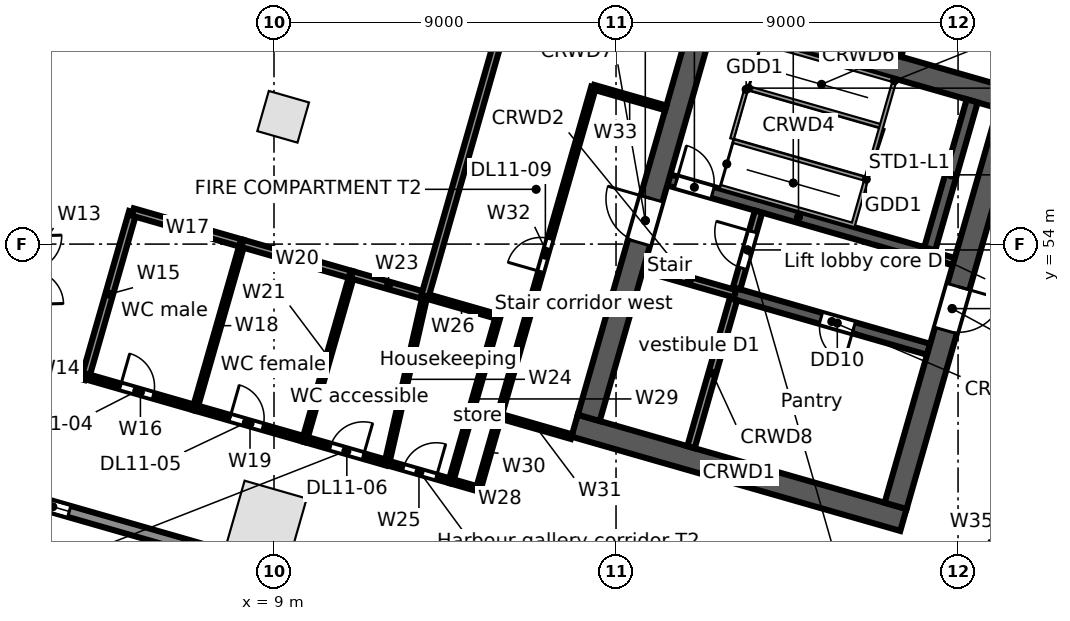
"""IFC4 building model, lengths in metres.
Left out: names, types, materials, properties, quantities, classifications, styles, units other than length and angle.
Written with IfcOpenShell. Run it as: python <this file> out.ifc"""

import sys

from ifc_helpers import new_model, si_unit, direction, frame, frame_2d, origin, origin_2d, place, context, subcontext, project, spatial, rectangle, extrude, element, fill, save


model = new_model("IFC4")
c1 = context("Model", 3, precision=1e-05, world=origin(), true_north=direction((0.0, 1.0)))
c2 = subcontext(c1, "Body", "Model", "MODEL_VIEW")
j1 = project(units=[si_unit("LENGTHUNIT", "METRE"), si_unit("PLANEANGLEUNIT", "RADIAN")], contexts=[c1])
p1 = place(None, origin())
s1 = spatial("IfcSite", under=j1, at=p1, CompositionType="ELEMENT")
p2 = place(p1, origin())
s2 = spatial("IfcBuilding", under=s1, at=p2, CompositionType="ELEMENT")
p3 = place(p2, frame((0.0, 0.0, 56.5)))
s3 = spatial("IfcBuildingStorey", under=s2, at=p3, CompositionType="ELEMENT", Elevation=56.5)
p4 = place(p3, frame((8.81, 46.722, 0.0), z_axis=(0.0, 0.0, 1.0), x_axis=(0.961261695938, -0.275637355817, 0.0)))
e1 = element("IfcColumn", 1, at=p4, inside=s3, PredefinedType="COLUMN", context=c2, shape_type="SweptSolid", body=[
    extrude(rectangle(XDim=1.7, YDim=1.7, at=origin_2d()), origin(), (0.0, 0.0, 1.0), 5.0),
])
p5 = place(p3, frame((9.241, 57.35, 0.0), z_axis=(0.0, 0.0, 1.0), x_axis=(0.961261695938, -0.275637355817, 0.0)))
e2 = element("IfcColumn", 2, at=p5, inside=s3, PredefinedType="COLUMN", context=c2, shape_type="SweptSolid", body=[
    extrude(rectangle(XDim=1.1, YDim=1.1, at=origin_2d()), origin(), (0.0, 0.0, 1.0), 5.0),
])
p6 = place(p3, frame((25.398, 40.717, 0.0), z_axis=(0.0, 0.0, 1.0), x_axis=(-0.961262423262, 0.275634819324, 0.0)))
e3 = element("IfcWall", 3, at=p6, inside=s3, PredefinedType="STANDARD", context=c2, shape_type="SweptSolid", body=[
    extrude(rectangle(XDim=26.359, YDim=0.3, at=frame_2d((13.179, 0.0))), origin(), (0.0, 0.0, 1.0), 4.68),
])
p7 = place(p6, frame((22.664, 0.0, 0.6)))
e4 = element("IfcOpeningElement", 4, at=p7, cuts=e3, PredefinedType="OPENING", context=c2, shape_type="SweptSolid", body=[
    extrude(rectangle(XDim=0.9, YDim=3.2, at=frame_2d((0.45, 1.6))), frame((0.0, 0.16, 0.0), z_axis=(0.0, -1.0, 0.0), x_axis=(1.0, 0.0, 0.0)), (0.0, 0.0, 1.0), 0.32),
])
p8 = place(p6, frame((13.844, 0.0, 0.6)))
e5 = element("IfcOpeningElement", 5, at=p8, cuts=e3, PredefinedType="OPENING", context=c2, shape_type="SweptSolid", body=[
    extrude(rectangle(XDim=0.9, YDim=3.2, at=frame_2d((0.45, 1.6))), frame((0.0, 0.16, 0.0), z_axis=(0.0, -1.0, 0.0), x_axis=(1.0, 0.0, 0.0)), (0.0, 0.0, 1.0), 0.32),
])
p9 = place(p6, frame((5.023, 0.0, 0.6)))
e6 = element("IfcOpeningElement", 6, at=p9, cuts=e3, PredefinedType="OPENING", context=c2, shape_type="SweptSolid", body=[
    extrude(rectangle(XDim=0.9, YDim=3.2, at=frame_2d((0.45, 1.6))), frame((0.0, 0.16, 0.0), z_axis=(0.0, -1.0, 0.0), x_axis=(1.0, 0.0, 0.0)), (0.0, 0.0, 1.0), 0.32),
])
p10 = place(p3, frame((16.911, 49.221, 0.0), z_axis=(0.0, 0.0, 1.0), x_axis=(0.96126248289, -0.275634611374, 0.0)))
e7 = element("IfcWall", 7, at=p10, inside=s3, PredefinedType="SOLIDWALL", context=c2, shape_type="SweptSolid", body=[
    extrude(rectangle(XDim=9.0, YDim=0.6, at=frame_2d((4.5, 0.0))), origin(), (0.0, 0.0, 1.0), 4.68),
])
p11 = place(p3, frame((18.728, 53.382, 0.0), z_axis=(0.0, 0.0, 1.0), x_axis=(0.961247070632, -0.275688355216, 0.0)))
e8 = element("IfcWall", 8, at=p11, inside=s3, PredefinedType="SOLIDWALL", context=c2, shape_type="SweptSolid", body=[
    extrude(rectangle(XDim=2.5, YDim=0.2, at=frame_2d((1.25, 0.0))), origin(), (0.0, 0.0, 1.0), 4.68),
])
p12 = place(p3, frame((21.131, 52.692, 0.0), z_axis=(0.0, 0.0, 1.0), x_axis=(0.961271492568, -0.275603188616, 0.0)))
e9 = element("IfcWall", 9, at=p12, inside=s3, PredefinedType="SOLIDWALL", context=c2, shape_type="SweptSolid", body=[
    extrude(rectangle(XDim=5.3, YDim=0.3, at=frame_2d((2.65, 0.0))), origin(), (0.0, 0.0, 1.0), 4.68),
])
p13 = place(p12, frame((2.35, 0.0, 0.0)))
e10 = element("IfcOpeningElement", 10, at=p13, cuts=e9, PredefinedType="OPENING", context=c2, shape_type="SweptSolid", body=[
    extrude(rectangle(XDim=0.9, YDim=2.1, at=frame_2d((0.45, 1.05))), frame((0.0, 0.16, 0.0), z_axis=(0.0, -1.0, 0.0), x_axis=(1.0, 0.0, 0.0)), (0.0, 0.0, 1.0), 0.32),
])
p14 = place(p3, frame((19.389, 55.689, 0.0), z_axis=(0.0, 0.0, 1.0), x_axis=(0.961261397636, -0.275638396117, 0.0)))
e11 = element("IfcWall", 11, at=p14, inside=s3, PredefinedType="SOLIDWALL", context=c2, shape_type="SweptSolid", body=[
    extrude(rectangle(XDim=7.1, YDim=0.3, at=frame_2d((3.55, 0.0))), origin(), (0.0, 0.0, 1.0), 4.68),
])
p15 = place(p14, frame((0.2, 0.0, 0.0)))
e12 = element("IfcOpeningElement", 12, at=p15, cuts=e11, PredefinedType="OPENING", context=c2, shape_type="SweptSolid", body=[
    extrude(rectangle(XDim=1.0, YDim=2.1, at=frame_2d((0.5, 1.05))), frame((0.0, 0.16, 0.0), z_axis=(0.0, -1.0, 0.0), x_axis=(1.0, 0.0, 0.0)), (0.0, 0.0, 1.0), 0.32),
])
p16 = place(p3, frame((26.214, 53.732, 0.0), z_axis=(0.0, 0.0, 1.0), x_axis=(0.96122076476, -0.27578005982, 0.0)))
e13 = element("IfcWall", 13, at=p16, inside=s3, PredefinedType="SOLIDWALL", context=c2, shape_type="SweptSolid", body=[
    extrude(rectangle(XDim=0.7, YDim=0.2, at=frame_2d((0.35, 0.0))), origin(), (0.0, 0.0, 1.0), 4.68),
])
p17 = place(p3, frame((20.053, 60.18, 0.0), z_axis=(0.0, 0.0, 1.0), x_axis=(0.96126248289, -0.275634611374, 0.0)))
e14 = element("IfcWall", 14, at=p17, inside=s3, PredefinedType="SOLIDWALL", context=c2, shape_type="SweptSolid", body=[
    extrude(rectangle(XDim=9.0, YDim=0.6, at=frame_2d((4.5, 0.0))), origin(), (0.0, 0.0, 1.0), 4.68),
])
p18 = place(p3, frame((17.282, 49.427, 0.0), z_axis=(0.0, 0.0, 1.0), x_axis=(0.275631631629, 0.961263337304, 0.0)))
e15 = element("IfcWall", 15, at=p18, inside=s3, PredefinedType="SOLIDWALL", context=c2, shape_type="SweptSolid", body=[
    extrude(rectangle(XDim=10.8, YDim=0.6, at=frame_2d((5.4, 0.0))), origin(), (0.0, 0.0, 1.0), 4.68),
])
p19 = place(p18, frame((4.8, 0.0, 0.0)))
e16 = element("IfcOpeningElement", 16, at=p19, cuts=e15, PredefinedType="OPENING", context=c2, shape_type="SweptSolid", body=[
    extrude(rectangle(XDim=1.2, YDim=2.1, at=frame_2d((0.6, 1.05))), frame((0.0, 0.31, 0.0), z_axis=(0.0, -1.0, 0.0), x_axis=(1.0, 0.0, 0.0)), (0.0, 0.0, 1.0), 0.62),
])
p20 = place(p3, frame((19.973, 48.655, 0.0), z_axis=(0.0, 0.0, 1.0), x_axis=(0.275668441653, 0.961252781674, 0.0)))
e17 = element("IfcWall", 17, at=p20, inside=s3, PredefinedType="SOLIDWALL", context=c2, shape_type="SweptSolid", body=[
    extrude(rectangle(XDim=4.05, YDim=0.2, at=frame_2d((2.025, 0.0))), origin(), (0.0, 0.0, 1.0), 4.68),
])
p21 = place(p3, frame((21.172, 52.837, 0.0), z_axis=(0.0, 0.0, 1.0), x_axis=(0.275657676022, 0.961255868981, 0.0)))
e18 = element("IfcWall", 18, at=p21, inside=s3, PredefinedType="PARTITIONING", context=c2, shape_type="SweptSolid", body=[
    extrude(rectangle(XDim=2.1, YDim=0.2, at=frame_2d((1.05, 0.0))), origin(), (0.0, 0.0, 1.0), 4.68),
])
p22 = place(p21, frame((0.55, 0.0, 0.0)))
e19 = element("IfcOpeningElement", 19, at=p22, cuts=e18, PredefinedType="OPENING", context=c2, shape_type="SweptSolid", body=[
    extrude(rectangle(XDim=1.0, YDim=2.1, at=frame_2d((0.5, 1.05))), frame((0.0, 0.11, 0.0), z_axis=(0.0, -1.0, 0.0), x_axis=(1.0, 0.0, 0.0)), (0.0, 0.0, 1.0), 0.22),
])
p23 = place(p3, frame((26.256, 53.876, 0.0), z_axis=(0.0, 0.0, 1.0), x_axis=(0.275612739511, 0.961268754209, 0.0)))
e20 = element("IfcWall", 20, at=p23, inside=s3, PredefinedType="SOLIDWALL", context=c2, shape_type="SweptSolid", body=[
    extrude(rectangle(XDim=4.05, YDim=0.3, at=frame_2d((2.025, 0.0))), origin(), (0.0, 0.0, 1.0), 4.68),
])
p24 = place(p3, frame((25.356, 47.112, 0.0), z_axis=(0.0, 0.0, 1.0), x_axis=(0.275631631629, 0.961263337304, 0.0)))
e21 = element("IfcWall", 21, at=p24, inside=s3, PredefinedType="SOLIDWALL", context=c2, shape_type="SweptSolid", body=[
    extrude(rectangle(XDim=10.8, YDim=0.6, at=frame_2d((5.4, 0.0))), origin(), (0.0, 0.0, 1.0), 4.68),
])
p25 = place(p24, frame((4.8, 0.0, 0.0)))
e22 = element("IfcOpeningElement", 22, at=p25, cuts=e21, PredefinedType="OPENING", context=c2, shape_type="SweptSolid", body=[
    extrude(rectangle(XDim=1.2, YDim=2.1, at=frame_2d((0.6, 1.05))), frame((0.0, 0.31, 0.0), z_axis=(0.0, -1.0, 0.0), x_axis=(1.0, 0.0, 0.0)), (0.0, 0.0, 1.0), 0.62),
])
p26 = place(p3, frame((2.601, 50.932, 0.0), z_axis=(0.0, 0.0, 1.0), x_axis=(0.961197773994, -0.27586018065, 0.0)))
e23 = element("IfcWall", 23, at=p26, inside=s3, PredefinedType="PARTITIONING", context=c2, shape_type="SweptSolid", body=[
    extrude(rectangle(XDim=1.5, YDim=0.2, at=frame_2d((0.75, 0.0))), origin(), (0.0, 0.0, 1.0), 4.68),
])
p27 = place(p3, frame((4.043, 50.518, 0.0), z_axis=(0.0, 0.0, 1.0), x_axis=(0.275745553681, 0.96123066411, 0.0)))
e24 = element("IfcWall", 24, at=p27, inside=s3, PredefinedType="PARTITIONING", context=c2, shape_type="SweptSolid", body=[
    extrude(rectangle(XDim=4.5, YDim=0.2, at=frame_2d((2.25, 0.0))), origin(), (0.0, 0.0, 1.0), 4.68),
])
p28 = place(p3, frame((4.043, 50.518, 0.0), z_axis=(0.0, 0.0, 1.0), x_axis=(0.961247103494, -0.275688240636, 0.0)))
e25 = element("IfcWall", 25, at=p28, inside=s3, PredefinedType="PARTITIONING", context=c2, shape_type="SweptSolid", body=[
    extrude(rectangle(XDim=3.0, YDim=0.15, at=frame_2d((1.5, 0.0))), origin(), (0.0, 0.0, 1.0), 4.68),
])
p29 = place(p28, frame((0.95, 0.0, 0.0)))
e26 = element("IfcOpeningElement", 26, at=p29, cuts=e25, PredefinedType="OPENING", context=c2, shape_type="SweptSolid", body=[
    extrude(rectangle(XDim=0.9, YDim=2.1, at=frame_2d((0.45, 1.05))), frame((0.0, 0.085, 0.0), z_axis=(0.0, -1.0, 0.0), x_axis=(1.0, 0.0, 0.0)), (0.0, 0.0, 1.0), 0.17),
])
p30 = place(p3, frame((5.284, 54.844, 0.0), z_axis=(0.0, 0.0, 1.0), x_axis=(0.961243927922, -0.275699312717, 0.0)))
e27 = element("IfcWall", 27, at=p30, inside=s3, PredefinedType="PARTITIONING", context=c2, shape_type="SweptSolid", body=[
    extrude(rectangle(XDim=2.999, YDim=0.2, at=frame_2d((1.5, 0.0))), origin(), (0.0, 0.0, 1.0), 4.68),
])
p31 = place(p3, frame((6.927, 49.691, 0.0), z_axis=(0.0, 0.0, 1.0), x_axis=(0.275530671241, 0.961292280841, 0.0)))
e28 = element("IfcWall", 28, at=p31, inside=s3, PredefinedType="PARTITIONING", context=c2, shape_type="SweptSolid", body=[
    extrude(rectangle(XDim=4.5, YDim=0.125, at=frame_2d((2.25, 0.0))), origin(), (0.0, 0.0, 1.0), 4.68),
])
p32 = place(p3, frame((6.927, 49.691, 0.0), z_axis=(0.0, 0.0, 1.0), x_axis=(0.961268664977, -0.27561305073, 0.0)))
e29 = element("IfcWall", 29, at=p32, inside=s3, PredefinedType="PARTITIONING", context=c2, shape_type="SweptSolid", body=[
    extrude(rectangle(XDim=3.0, YDim=0.15, at=frame_2d((1.5, 0.0))), origin(), (0.0, 0.0, 1.0), 3.742),
])
p33 = place(p32, frame((0.95, 0.0, 0.0)))
e30 = element("IfcOpeningElement", 30, at=p33, cuts=e29, PredefinedType="OPENING", context=c2, shape_type="SweptSolid", body=[
    extrude(rectangle(XDim=0.9, YDim=2.1, at=frame_2d((0.45, 1.05))), frame((0.0, 0.085, 0.0), z_axis=(0.0, -1.0, 0.0), x_axis=(1.0, 0.0, 0.0)), (0.0, 0.0, 1.0), 0.17),
])
p34 = place(p3, frame((8.167, 54.017, 0.0), z_axis=(0.0, 0.0, 1.0), x_axis=(0.961247103494, -0.275688240636, 0.0)))
e31 = element("IfcWall", 31, at=p34, inside=s3, PredefinedType="PARTITIONING", context=c2, shape_type="SweptSolid", body=[
    extrude(rectangle(XDim=3.0, YDim=0.2, at=frame_2d((1.5, 0.0))), origin(), (0.0, 0.0, 1.0), 3.742),
])
p35 = place(p3, frame((9.811, 48.864, 0.0), z_axis=(0.0, 0.0, 1.0), x_axis=(0.275545040649, 0.96128816209, 0.0)))
e32 = element("IfcWall", 32, at=p35, inside=s3, PredefinedType="PARTITIONING", context=c2, shape_type="SweptSolid", body=[
    extrude(rectangle(XDim=4.5, YDim=0.125, at=frame_2d((2.25, 0.0))), origin(), (0.0, 0.0, 1.0), 4.68),
])
p36 = place(p3, frame((9.811, 48.864, 0.0), z_axis=(0.0, 0.0, 1.0), x_axis=(0.961236680145, -0.275724581318, 0.0)))
e33 = element("IfcWall", 33, at=p36, inside=s3, PredefinedType="PARTITIONING", context=c2, shape_type="SweptSolid", body=[
    extrude(rectangle(XDim=2.249, YDim=0.15, at=frame_2d((1.125, 0.0))), origin(), (0.0, 0.0, 1.0), 4.68),
])
p37 = place(p36, frame((0.7, 0.0, 0.0)))
e34 = element("IfcOpeningElement", 34, at=p37, cuts=e33, PredefinedType="OPENING", context=c2, shape_type="SweptSolid", body=[
    extrude(rectangle(XDim=0.9, YDim=2.1, at=frame_2d((0.45, 1.05))), frame((0.0, 0.085, 0.0), z_axis=(0.0, -1.0, 0.0), x_axis=(1.0, 0.0, 0.0)), (0.0, 0.0, 1.0), 0.17),
])
p38 = place(p3, frame((11.051, 53.19, 0.0), z_axis=(0.0, 0.0, 1.0), x_axis=(0.961316434736, -0.275446387355, 0.0)))
e35 = element("IfcWall", 35, at=p38, inside=s3, PredefinedType="PARTITIONING", context=c2, shape_type="SweptSolid", body=[
    extrude(rectangle(XDim=2.0, YDim=0.2, at=frame_2d((1.0, 0.0))), origin(), (0.0, 0.0, 1.0), 4.68),
])
p39 = place(p3, frame((11.973, 48.244, 0.0), z_axis=(0.0, 0.0, 1.0), x_axis=(0.222117362571, 0.975019936845, 0.0)))
e36 = element("IfcWall", 36, at=p39, inside=s3, PredefinedType="PARTITIONING", context=c2, shape_type="SweptSolid", body=[
    extrude(rectangle(XDim=4.508, YDim=0.125, at=frame_2d((2.254, 0.0))), origin(), (0.0, 0.0, 1.0), 4.68),
])
p40 = place(p3, frame((11.973, 48.244, 0.0), z_axis=(0.0, 0.0, 1.0), x_axis=(0.96136592135, -0.275273618907, 0.0)))
e37 = element("IfcWall", 37, at=p40, inside=s3, PredefinedType="PARTITIONING", context=c2, shape_type="SweptSolid", body=[
    extrude(rectangle(XDim=1.751, YDim=0.125, at=frame_2d((0.875, 0.0))), origin(), (0.0, 0.0, 1.0), 4.68),
])
p41 = place(p40, frame((0.45, 0.0, 0.0)))
e38 = element("IfcOpeningElement", 38, at=p41, cuts=e37, PredefinedType="OPENING", context=c2, shape_type="SweptSolid", body=[
    extrude(rectangle(XDim=0.9, YDim=2.1, at=frame_2d((0.45, 1.05))), frame((0.0, 0.073, 0.0), z_axis=(0.0, -1.0, 0.0), x_axis=(1.0, 0.0, 0.0)), (0.0, 0.0, 1.0), 0.145),
])
p42 = place(p3, frame((12.974, 52.639, 0.0), z_axis=(0.0, 0.0, 1.0), x_axis=(0.961270097305, -0.275608055084, 0.0)))
e39 = element("IfcWall", 39, at=p42, inside=s3, PredefinedType="PARTITIONING", context=c2, shape_type="SweptSolid", body=[
    extrude(rectangle(XDim=1.999, YDim=0.125, at=frame_2d((1.0, 0.0))), origin(), (0.0, 0.0, 1.0), 4.68),
])
p43 = place(p3, frame((12.974, 52.639, 0.0), z_axis=(0.0, 0.0, 1.0), x_axis=(0.275299463768, 0.961358520662, 0.0)))
e40 = element("IfcWall", 40, at=p43, inside=s3, PredefinedType="PARTITIONING", context=c2, shape_type="SweptSolid", body=[
    extrude(rectangle(XDim=14.885, YDim=0.2, at=frame_2d((7.443, 0.0))), origin(), (0.0, 0.0, 1.0), 3.742),
])
p44 = place(p3, frame((13.656, 47.762, 0.0), z_axis=(0.0, 0.0, 1.0), x_axis=(0.961154610169, -0.276010534854, 0.0)))
e41 = element("IfcWall", 41, at=p44, inside=s3, PredefinedType="PARTITIONING", context=c2, shape_type="SweptSolid", body=[
    extrude(rectangle(XDim=0.75, YDim=0.125, at=frame_2d((0.375, 0.0))), origin(), (0.0, 0.0, 1.0), 4.68),
])
p45 = place(p3, frame((13.656, 47.762, 0.0), z_axis=(0.0, 0.0, 1.0), x_axis=(0.275545040649, 0.96128816209, 0.0)))
e42 = element("IfcWall", 42, at=p45, inside=s3, PredefinedType="PARTITIONING", context=c2, shape_type="SweptSolid", body=[
    extrude(rectangle(XDim=4.5, YDim=0.125, at=frame_2d((2.25, 0.0))), origin(), (0.0, 0.0, 1.0), 4.68),
])
p46 = place(p3, frame((14.377, 47.555, 0.0), z_axis=(0.0, 0.0, 1.0), x_axis=(0.275446387355, 0.961316434736, 0.0)))
e43 = element("IfcWall", 43, at=p46, inside=s3, PredefinedType="PARTITIONING", context=c2, shape_type="SweptSolid", body=[
    extrude(rectangle(XDim=2.0, YDim=0.125, at=frame_2d((1.0, 0.0))), origin(), (0.0, 0.0, 1.0), 4.68),
])
p47 = place(p3, frame((14.928, 49.478, 0.0), z_axis=(0.0, 0.0, 1.0), x_axis=(0.961243778232, -0.27569983462, 0.0)))
e44 = element("IfcWall", 44, at=p47, inside=s3, PredefinedType="PARTITIONING", context=c2, shape_type="SweptSolid", body=[
    extrude(rectangle(XDim=1.977, YDim=0.125, at=frame_2d((0.988, 0.0))), origin(), (0.0, 0.0, 1.0), 4.68),
])
p48 = place(p3, frame((14.928, 49.478, 0.0), z_axis=(0.0, 0.0, 1.0), x_axis=(0.275674053528, 0.961251172281, 0.0)))
e45 = element("IfcWall", 45, at=p48, inside=s3, PredefinedType="PARTITIONING", context=c2, shape_type="SweptSolid", body=[
    extrude(rectangle(XDim=9.0, YDim=0.125, at=frame_2d((4.5, 0.0))), origin(), (0.0, 0.0, 1.0), 3.742),
])
p49 = place(p48, frame((3.95, 0.0, 0.0)))
e46 = element("IfcOpeningElement", 46, at=p49, cuts=e45, PredefinedType="OPENING", context=c2, shape_type="SweptSolid", body=[
    extrude(rectangle(XDim=0.9, YDim=2.1, at=frame_2d((0.45, 1.05))), frame((0.0, 0.073, 0.0), z_axis=(0.0, -1.0, 0.0), x_axis=(1.0, 0.0, 0.0)), (0.0, 0.0, 1.0), 0.145),
])
p50 = place(p3, frame((17.409, 58.129, 0.0), z_axis=(0.0, 0.0, 1.0), x_axis=(0.961253165474, -0.275667103345, 0.0)))
e47 = element("IfcWall", 47, at=p50, inside=s3, PredefinedType="PARTITIONING", context=c2, shape_type="SweptSolid", body=[
    extrude(rectangle(XDim=1.977, YDim=0.125, at=frame_2d((0.988, 0.0))), origin(), (0.0, 0.0, 1.0), 4.68),
])
p51 = place(p3, frame((25.445, 58.946, 0.0), z_axis=(0.0, 0.0, 1.0), x_axis=(0.268850353538, 0.963181959654, 0.0)))
e48 = element("IfcWall", 48, at=p51, inside=s3, PredefinedType="PARTITIONING", context=c2, shape_type="SweptSolid", body=[
    extrude(rectangle(XDim=3.485, YDim=0.125, at=frame_2d((1.743, 0.0))), origin(), (0.0, 0.0, 1.0), 4.154),
])
p52 = place(p3, frame((26.456, 42.338, 0.0), z_axis=(0.0, 0.0, 1.0), x_axis=(0.52980027265, 0.848122438743, 0.0)))
e49 = element("IfcWall", 49, at=p52, inside=s3, PredefinedType="PARTITIONING", context=c2, shape_type="SweptSolid", body=[
    extrude(rectangle(XDim=6.076, YDim=0.25, at=frame_2d((3.038, 0.0))), origin(), (0.0, 0.0, 1.0), 4.68),
])
p53 = place(p52, frame((2.2, 0.0, 0.0)))
e50 = element("IfcOpeningElement", 50, at=p53, cuts=e49, PredefinedType="OPENING", context=c2, shape_type="SweptSolid", body=[
    extrude(rectangle(XDim=1.8, YDim=2.1, at=frame_2d((0.9, 1.05))), frame((0.0, 0.135, 0.0), z_axis=(0.0, -1.0, 0.0), x_axis=(1.0, 0.0, 0.0)), (0.0, 0.0, 1.0), 0.27),
])
p54 = place(p7, origin())
e51 = element("IfcWindow", 51, at=p54, inside=s3, PartitioningType="SINGLE_PANEL", PredefinedType="WINDOW", context=c2, shape_type="SweptSolid", body=[
    extrude(rectangle(XDim=0.9, YDim=3.2, at=frame_2d((0.45, 1.6))), frame((0.0, 0.03, 0.0), z_axis=(0.0, -1.0, 0.0), x_axis=(1.0, 0.0, 0.0)), (0.0, 0.0, 1.0), 0.06),
])
fill(e4, e51)
p55 = place(p15, origin())
e52 = element("IfcDoor", 52, at=p55, inside=s3, OperationType="SINGLE_SWING_LEFT", PredefinedType="DOOR", context=c2, shape_type="SweptSolid", body=[
    extrude(rectangle(XDim=1.0, YDim=2.1, at=frame_2d((0.5, 1.05))), frame((0.0, 0.025, 0.0), z_axis=(0.0, -1.0, 0.0), x_axis=(1.0, 0.0, 0.0)), (0.0, 0.0, 1.0), 0.05),
])
fill(e12, e52)
p56 = place(p22, origin())
e53 = element("IfcDoor", 53, at=p56, inside=s3, OperationType="SINGLE_SWING_RIGHT", PredefinedType="DOOR", context=c2, shape_type="SweptSolid", body=[
    extrude(rectangle(XDim=1.0, YDim=2.1, at=frame_2d((0.5, 1.05))), frame((0.0, 0.025, 0.0), z_axis=(0.0, -1.0, 0.0), x_axis=(1.0, 0.0, 0.0)), (0.0, 0.0, 1.0), 0.05),
])
fill(e19, e53)
p57 = place(p19, origin())
e54 = element("IfcDoor", 54, at=p57, inside=s3, OperationType="SINGLE_SWING_RIGHT", PredefinedType="DOOR", context=c2, shape_type="SweptSolid", body=[
    extrude(rectangle(XDim=1.2, YDim=2.1, at=frame_2d((0.6, 1.05))), frame((0.0, 0.025, 0.0), z_axis=(0.0, -1.0, 0.0), x_axis=(1.0, 0.0, 0.0)), (0.0, 0.0, 1.0), 0.05),
])
fill(e16, e54)
p58 = place(p25, frame((1.2, 0.0, 0.0), z_axis=(0.0, 0.0, 1.0), x_axis=(-1.0, 0.0, 0.0)))
e55 = element("IfcDoor", 55, at=p58, inside=s3, OperationType="SINGLE_SWING_LEFT", PredefinedType="DOOR", context=c2, shape_type="SweptSolid", body=[
    extrude(rectangle(XDim=1.2, YDim=2.1, at=frame_2d((0.6, 1.05))), frame((0.0, 0.025, 0.0), z_axis=(0.0, -1.0, 0.0), x_axis=(1.0, 0.0, 0.0)), (0.0, 0.0, 1.0), 0.05),
])
fill(e22, e55)
p59 = place(p13, frame((0.9, 0.0, 0.0), z_axis=(0.0, 0.0, 1.0), x_axis=(-1.0, 0.0, 0.0)))
e56 = element("IfcDoor", 56, at=p59, inside=s3, OperationType="SINGLE_SWING_LEFT", PredefinedType="DOOR", context=c2, shape_type="SweptSolid", body=[
    extrude(rectangle(XDim=0.9, YDim=2.1, at=frame_2d((0.45, 1.05))), frame((0.0, 0.025, 0.0), z_axis=(0.0, -1.0, 0.0), x_axis=(1.0, 0.0, 0.0)), (0.0, 0.0, 1.0), 0.05),
])
fill(e10, e56)
p60 = place(p29, origin())
e57 = element("IfcDoor", 57, at=p60, inside=s3, OperationType="SINGLE_SWING_LEFT", PredefinedType="DOOR", context=c2, shape_type="SweptSolid", body=[
    extrude(rectangle(XDim=0.9, YDim=2.1, at=frame_2d((0.45, 1.05))), frame((0.0, 0.025, 0.0), z_axis=(0.0, -1.0, 0.0), x_axis=(1.0, 0.0, 0.0)), (0.0, 0.0, 1.0), 0.05),
])
fill(e26, e57)
p61 = place(p33, origin())
e58 = element("IfcDoor", 58, at=p61, inside=s3, OperationType="SINGLE_SWING_LEFT", PredefinedType="DOOR", context=c2, shape_type="SweptSolid", body=[
    extrude(rectangle(XDim=0.9, YDim=2.1, at=frame_2d((0.45, 1.05))), frame((0.0, 0.025, 0.0), z_axis=(0.0, -1.0, 0.0), x_axis=(1.0, 0.0, 0.0)), (0.0, 0.0, 1.0), 0.05),
])
fill(e30, e58)
p62 = place(p37, origin())
e59 = element("IfcDoor", 59, at=p62, inside=s3, OperationType="SINGLE_SWING_RIGHT", PredefinedType="DOOR", context=c2, shape_type="SweptSolid", body=[
    extrude(rectangle(XDim=0.9, YDim=2.1, at=frame_2d((0.45, 1.05))), frame((0.0, 0.025, 0.0), z_axis=(0.0, -1.0, 0.0), x_axis=(1.0, 0.0, 0.0)), (0.0, 0.0, 1.0), 0.05),
])
fill(e34, e59)
p63 = place(p41, origin())
e60 = element("IfcDoor", 60, at=p63, inside=s3, OperationType="SINGLE_SWING_RIGHT", PredefinedType="DOOR", context=c2, shape_type="SweptSolid", body=[
    extrude(rectangle(XDim=0.9, YDim=2.1, at=frame_2d((0.45, 1.05))), frame((0.0, 0.025, 0.0), z_axis=(0.0, -1.0, 0.0), x_axis=(1.0, 0.0, 0.0)), (0.0, 0.0, 1.0), 0.05),
])
fill(e38, e60)
p64 = place(p49, origin())
e61 = element("IfcDoor", 61, at=p64, inside=s3, OperationType="SINGLE_SWING_LEFT", PredefinedType="DOOR", context=c2, shape_type="SweptSolid", body=[
    extrude(rectangle(XDim=0.9, YDim=2.1, at=frame_2d((0.45, 1.05))), frame((0.0, 0.025, 0.0), z_axis=(0.0, -1.0, 0.0), x_axis=(1.0, 0.0, 0.0)), (0.0, 0.0, 1.0), 0.05),
])
fill(e46, e61)
save(model, sys.argv[1])
